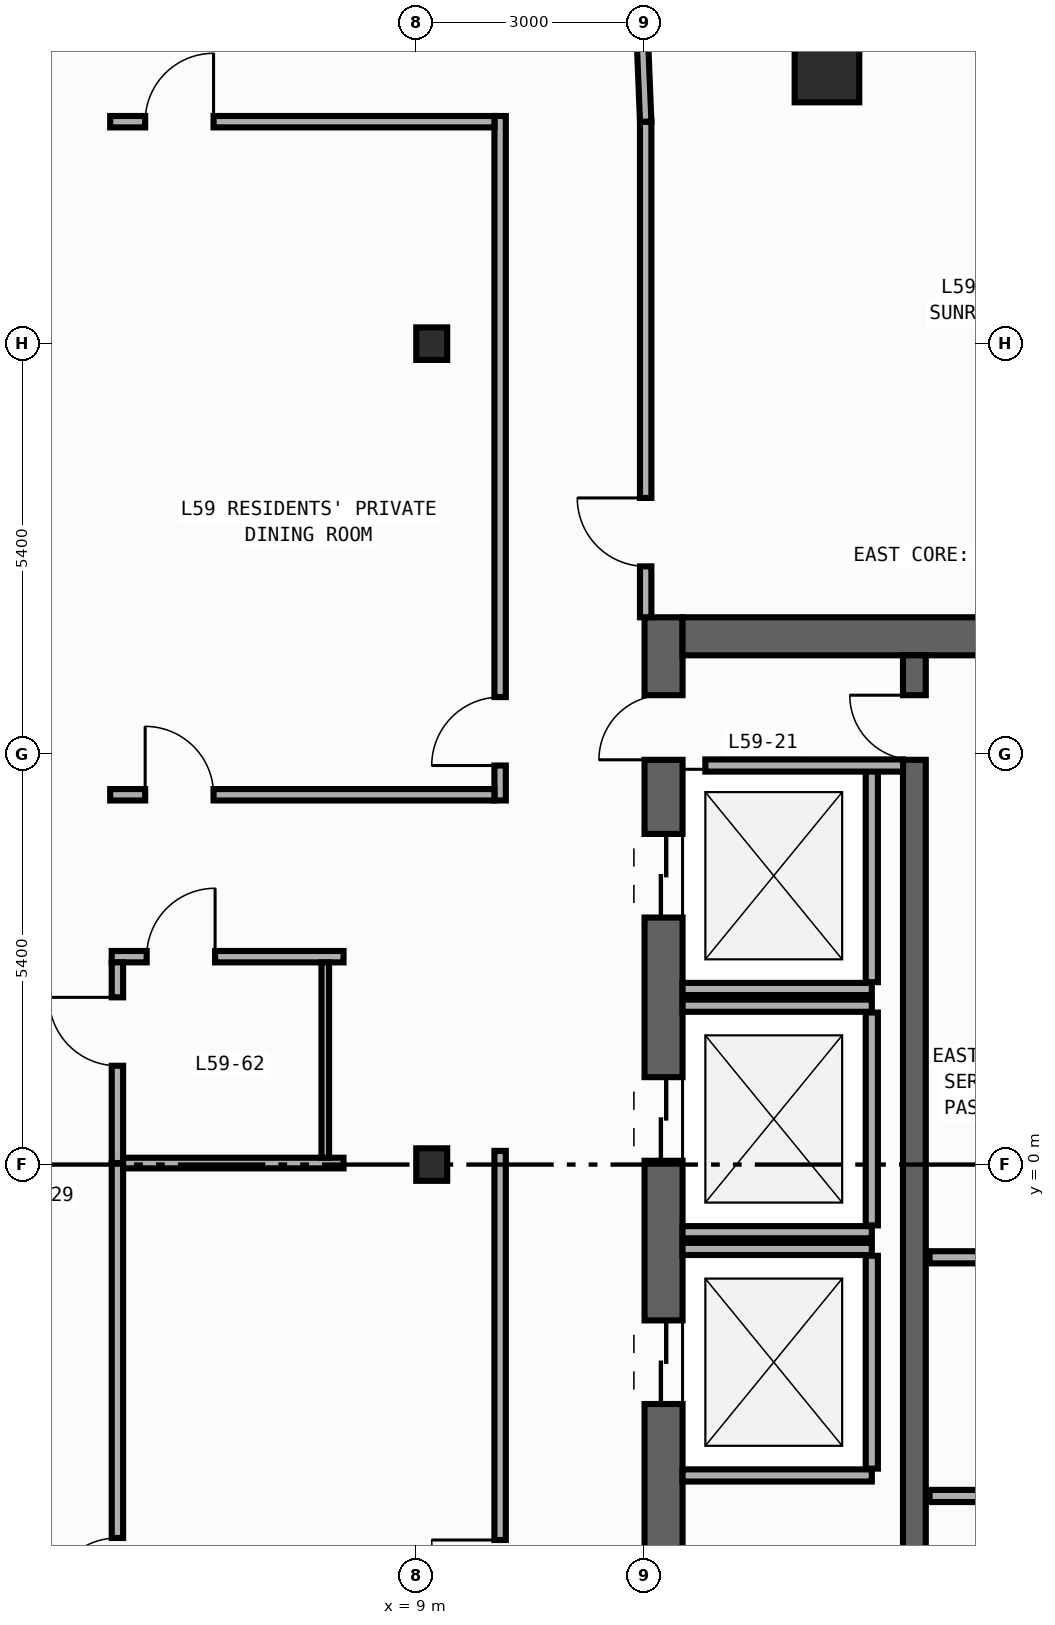
"""IFC4 building model, lengths in metres.
Left out: names, types, materials, properties, quantities, classifications, styles, units other than length and angle.
Written with IfcOpenShell. Run it as: python <this file> out.ifc"""

import sys

from ifc_helpers import new_model, si_unit, direction, frame, frame_2d, origin, origin_2d, place, context, subcontext, project, spatial, rectangle, i_section, extrude, element, fill, save


model = new_model("IFC4")
c1 = context("Model", 3, precision=1e-05, world=origin(), true_north=direction((0.0, 1.0)))
c2 = subcontext(c1, "Body", "Model", "MODEL_VIEW")
j1 = project(units=[si_unit("LENGTHUNIT", "METRE"), si_unit("PLANEANGLEUNIT", "RADIAN")], contexts=[c1])
p1 = place(None, origin())
s1 = spatial("IfcSite", under=j1, at=p1, CompositionType="ELEMENT")
p2 = place(p1, origin())
s2 = spatial("IfcBuilding", under=s1, at=p2, CompositionType="ELEMENT")
p3 = place(p2, frame((0.0, 0.0, 251.2)))
s3 = spatial("IfcBuildingStorey", under=s2, at=p3, CompositionType="ELEMENT", Elevation=251.2)
p4 = place(p3, frame((12.25, -19.8, 0.0), z_axis=(0.0, 0.0, 1.0), x_axis=(0.0, 1.0, 0.0)))
e1 = element("IfcWall", 1, at=p4, inside=s3, PredefinedType="SHEAR", context=c2, shape_type="SweptSolid", body=[
    extrude(rectangle(XDim=27.0, YDim=0.5, at=frame_2d((13.5, 0.0))), origin(), (0.0, 0.0, 1.0), 3.34),
])
p5 = place(p4, frame((23.05, 0.0, 0.0)))
e2 = element("IfcOpeningElement", 2, at=p5, cuts=e1, PredefinedType="OPENING", context=c2, shape_type="SweptSolid", body=[
    extrude(rectangle(XDim=1.1, YDim=2.2, at=frame_2d((0.55, 1.1))), frame((0.0, 0.26, 0.0), z_axis=(0.0, -1.0, 0.0), x_axis=(1.0, 0.0, 0.0)), (0.0, 0.0, 1.0), 0.52),
])
p6 = place(p4, frame((19.85, 0.0, 0.0)))
e3 = element("IfcOpeningElement", 3, at=p6, cuts=e1, PredefinedType="OPENING", context=c2, shape_type="SweptSolid", body=[
    extrude(rectangle(XDim=1.1, YDim=2.2, at=frame_2d((0.55, 1.1))), frame((0.0, 0.26, 0.0), z_axis=(0.0, -1.0, 0.0), x_axis=(1.0, 0.0, 0.0)), (0.0, 0.0, 1.0), 0.52),
])
p7 = place(p4, frame((16.65, 0.0, 0.0)))
e4 = element("IfcOpeningElement", 4, at=p7, cuts=e1, PredefinedType="OPENING", context=c2, shape_type="SweptSolid", body=[
    extrude(rectangle(XDim=1.1, YDim=2.2, at=frame_2d((0.55, 1.1))), frame((0.0, 0.26, 0.0), z_axis=(0.0, -1.0, 0.0), x_axis=(1.0, 0.0, 0.0)), (0.0, 0.0, 1.0), 0.52),
])
p8 = place(p4, frame((10.175, 0.0, 0.0)))
e5 = element("IfcOpeningElement", 5, at=p8, cuts=e1, PredefinedType="OPENING", context=c2, shape_type="SweptSolid", body=[
    extrude(rectangle(XDim=0.85, YDim=2.1, at=frame_2d((0.425, 1.05))), frame((0.0, 0.26, 0.0), z_axis=(0.0, -1.0, 0.0), x_axis=(1.0, 0.0, 0.0)), (0.0, 0.0, 1.0), 0.52),
])
p9 = place(p4, frame((12.725, 0.0, 0.0)))
e6 = element("IfcOpeningElement", 6, at=p9, cuts=e1, PredefinedType="OPENING", context=c2, shape_type="SweptSolid", body=[
    extrude(rectangle(XDim=1.15, YDim=2.2, at=frame_2d((0.575, 1.1))), frame((0.0, 0.26, 0.0), z_axis=(0.0, -1.0, 0.0), x_axis=(1.0, 0.0, 0.0)), (0.0, 0.0, 1.0), 0.52),
])
p10 = place(p4, frame((25.125, 0.0, 0.0)))
e7 = element("IfcOpeningElement", 7, at=p10, cuts=e1, PredefinedType="OPENING", context=c2, shape_type="SweptSolid", body=[
    extrude(rectangle(XDim=0.85, YDim=2.1, at=frame_2d((0.425, 1.05))), frame((0.0, 0.26, 0.0), z_axis=(0.0, -1.0, 0.0), x_axis=(1.0, 0.0, 0.0)), (0.0, 0.0, 1.0), 0.52),
])
p11 = place(p3, frame((12.5, 6.95, 0.0), z_axis=(0.0, 0.0, 1.0), x_axis=(1.0, 0.0, 0.0)))
e8 = element("IfcWall", 8, at=p11, inside=s3, PredefinedType="SHEAR", context=c2, shape_type="SweptSolid", body=[
    extrude(rectangle(XDim=7.4, YDim=0.5, at=frame_2d((3.7, 0.0))), origin(), (0.0, 0.0, 1.0), 3.34),
])
p12 = place(p3, frame((15.55, -19.3, 0.0), z_axis=(0.0, 0.0, 1.0), x_axis=(0.0, 1.0, 0.0)))
e9 = element("IfcWall", 9, at=p12, inside=s3, PredefinedType="SHEAR", context=c2, shape_type="SweptSolid", body=[
    extrude(rectangle(XDim=26.0, YDim=0.3, at=frame_2d((13.0, 0.0))), origin(), (0.0, 0.0, 1.0), 3.34),
])
p13 = place(p12, frame((12.225, 0.0, 0.0)))
e10 = element("IfcOpeningElement", 10, at=p13, cuts=e9, PredefinedType="OPENING", context=c2, shape_type="SweptSolid", body=[
    extrude(rectangle(XDim=1.15, YDim=2.2, at=frame_2d((0.575, 1.1))), frame((0.0, 0.16, 0.0), z_axis=(0.0, -1.0, 0.0), x_axis=(1.0, 0.0, 0.0)), (0.0, 0.0, 1.0), 0.32),
])
p14 = place(p12, frame((24.625, 0.0, 0.0)))
e11 = element("IfcOpeningElement", 11, at=p14, cuts=e9, PredefinedType="OPENING", context=c2, shape_type="SweptSolid", body=[
    extrude(rectangle(XDim=0.85, YDim=2.1, at=frame_2d((0.425, 1.05))), frame((0.0, 0.16, 0.0), z_axis=(0.0, -1.0, 0.0), x_axis=(1.0, 0.0, 0.0)), (0.0, 0.0, 1.0), 0.32),
])
for number, where, z_axis, x_axis in (
    (12, (9.2, 0.0, 0.0), (0.0, 0.0, 1.0), (1.0, 0.0, 0.0)),
    (13, (9.2, 10.8, 0.0), (0.0, 0.0, 1.0), (1.0, 0.0, 0.0)),
):
    element("IfcColumn", number, at=place(p3, frame(where, z_axis=z_axis, x_axis=x_axis)), inside=s3, PredefinedType="COLUMN", context=c2, shape_type="SweptSolid", body=[
        extrude(i_section(OverallWidth=0.407, OverallDepth=0.428, WebThickness=0.02, FlangeThickness=0.035, FilletRadius=0.022, at=origin_2d()), origin(), (0.0, 0.0, 1.0), 3.6),
    ])
p15 = place(p3, frame((14.4, 14.4, 0.0), z_axis=(0.0, 0.0, 1.0), x_axis=(1.0, 0.0, 0.0)))
e14 = element("IfcColumn", 14, at=p15, inside=s3, PredefinedType="COLUMN", context=c2, shape_type="SweptSolid", body=[
    extrude(rectangle(XDim=0.85, YDim=0.85, at=origin_2d()), origin(), (0.0, 0.0, 1.0), 3.6),
])
p16 = place(p3, frame((12.5, 2.31, 0.0), z_axis=(0.0, 0.0, 1.0), x_axis=(1.0, 0.0, 0.0)))
e15 = element("IfcWall", 15, at=p16, inside=s3, PredefinedType="STANDARD", context=c2, shape_type="SweptSolid", body=[
    extrude(rectangle(XDim=2.49, YDim=0.16, at=frame_2d((1.245, 0.0))), origin(), (0.0, 0.0, 1.0), 3.34),
])
p17 = place(p3, frame((14.99, 2.4, 0.0), z_axis=(0.0, 0.0, 1.0), x_axis=(0.0, 1.0, 0.0)))
e16 = element("IfcWall", 16, at=p17, inside=s3, PredefinedType="STANDARD", context=c2, shape_type="SweptSolid", body=[
    extrude(rectangle(XDim=2.8, YDim=0.16, at=frame_2d((1.4, 0.0))), origin(), (0.0, 0.0, 1.0), 3.34),
])
for number, where, z_axis, x_axis in (
    (17, (12.5, -0.89, 0.0), (0.0, 0.0, 1.0), (1.0, 0.0, 0.0)),
    (18, (12.5, 2.09, 0.0), (0.0, 0.0, 1.0), (1.0, 0.0, 0.0)),
):
    element("IfcWall", number, at=place(p3, frame(where, z_axis=z_axis, x_axis=x_axis)), inside=s3, PredefinedType="STANDARD", context=c2, shape_type="SweptSolid", body=[
        extrude(rectangle(XDim=2.49, YDim=0.16, at=frame_2d((1.245, 0.0))), origin(), (0.0, 0.0, 1.0), 3.34),
    ])
p18 = place(p3, frame((14.99, -0.8, 0.0), z_axis=(0.0, 0.0, 1.0), x_axis=(0.0, 1.0, 0.0)))
e19 = element("IfcWall", 19, at=p18, inside=s3, PredefinedType="STANDARD", context=c2, shape_type="SweptSolid", body=[
    extrude(rectangle(XDim=2.8, YDim=0.16, at=frame_2d((1.4, 0.0))), origin(), (0.0, 0.0, 1.0), 3.34),
])
for number, where, z_axis, x_axis in (
    (20, (12.5, -4.09, 0.0), (0.0, 0.0, 1.0), (1.0, 0.0, 0.0)),
    (21, (12.5, -1.11, 0.0), (0.0, 0.0, 1.0), (1.0, 0.0, 0.0)),
):
    element("IfcWall", number, at=place(p3, frame(where, z_axis=z_axis, x_axis=x_axis)), inside=s3, PredefinedType="STANDARD", context=c2, shape_type="SweptSolid", body=[
        extrude(rectangle(XDim=2.49, YDim=0.16, at=frame_2d((1.245, 0.0))), origin(), (0.0, 0.0, 1.0), 3.34),
    ])
p19 = place(p3, frame((14.99, -4.0, 0.0), z_axis=(0.0, 0.0, 1.0), x_axis=(0.0, 1.0, 0.0)))
e22 = element("IfcWall", 22, at=p19, inside=s3, PredefinedType="STANDARD", context=c2, shape_type="SweptSolid", body=[
    extrude(rectangle(XDim=2.8, YDim=0.16, at=frame_2d((1.4, 0.0))), origin(), (0.0, 0.0, 1.0), 3.34),
])
p20 = place(p3, frame((15.75, -4.36, 0.0), z_axis=(0.0, 0.0, 1.0), x_axis=(1.0, 0.0, 0.0)))
e23 = element("IfcWall", 23, at=p20, inside=s3, PredefinedType="STANDARD", context=c2, shape_type="SweptSolid", body=[
    extrude(rectangle(XDim=3.8, YDim=0.16, at=frame_2d((1.9, 0.0))), origin(), (0.0, 0.0, 1.0), 3.34),
])
p21 = place(p20, frame((1.47, 0.0, 0.0)))
e24 = element("IfcOpeningElement", 24, at=p21, cuts=e23, PredefinedType="OPENING", context=c2, shape_type="SweptSolid", body=[
    extrude(rectangle(XDim=1.15, YDim=2.2, at=frame_2d((0.575, 1.1))), frame((0.0, 0.09, 0.0), z_axis=(0.0, -1.0, 0.0), x_axis=(1.0, 0.0, 0.0)), (0.0, 0.0, 1.0), 0.18),
])
p22 = place(p3, frame((15.75, -1.22, 0.0), z_axis=(0.0, 0.0, 1.0), x_axis=(1.0, 0.0, 0.0)))
e25 = element("IfcWall", 25, at=p22, inside=s3, PredefinedType="STANDARD", context=c2, shape_type="SweptSolid", body=[
    extrude(rectangle(XDim=3.8, YDim=0.16, at=frame_2d((1.9, 0.0))), origin(), (0.0, 0.0, 1.0), 3.34),
])
p23 = place(p3, frame((12.8, 5.25, 0.0), z_axis=(0.0, 0.0, 1.0), x_axis=(1.0, 0.0, 0.0)))
e26 = element("IfcWall", 26, at=p23, inside=s3, PredefinedType="STANDARD", context=c2, shape_type="SweptSolid", body=[
    extrude(rectangle(XDim=2.6, YDim=0.16, at=frame_2d((1.3, 0.0))), origin(), (0.0, 0.0, 1.0), 3.34),
])
p24 = place(p3, frame((12.015, 7.2, 0.0), z_axis=(0.0, 0.0, 1.0), x_axis=(0.0, 1.0, 0.0)))
e27 = element("IfcWall", 27, at=p24, inside=s3, PredefinedType="PARTITIONING", context=c2, shape_type="SweptSolid", body=[
    extrude(rectangle(XDim=6.52, YDim=0.15, at=frame_2d((3.26, 0.0))), origin(), (0.0, 0.0, 1.0), 3.34),
])
p25 = place(p24, frame((0.67, 0.0, 0.0)))
e28 = element("IfcOpeningElement", 28, at=p25, cuts=e27, PredefinedType="OPENING", context=c2, shape_type="SweptSolid", body=[
    extrude(rectangle(XDim=0.9, YDim=2.15, at=frame_2d((0.45, 1.075))), frame((0.0, 0.085, 0.0), z_axis=(0.0, -1.0, 0.0), x_axis=(1.0, 0.0, 0.0)), (0.0, 0.0, 1.0), 0.17),
])
p26 = place(p3, frame((10.1, 4.79, 0.0), z_axis=(0.0, 0.0, 1.0), x_axis=(0.0, 1.0, 0.0)))
e29 = element("IfcWall", 29, at=p26, inside=s3, PredefinedType="PARTITIONING", context=c2, shape_type="SweptSolid", body=[
    extrude(rectangle(XDim=9.005, YDim=0.15, at=frame_2d((4.502, 0.0))), origin(), (0.0, 0.0, 1.0), 3.34),
])
p27 = place(p26, frame((0.46, 0.0, 0.0)))
e30 = element("IfcOpeningElement", 30, at=p27, cuts=e29, PredefinedType="OPENING", context=c2, shape_type="SweptSolid", body=[
    extrude(rectangle(XDim=0.9, YDim=2.15, at=frame_2d((0.45, 1.075))), frame((0.0, 0.085, 0.0), z_axis=(0.0, -1.0, 0.0), x_axis=(1.0, 0.0, 0.0)), (0.0, 0.0, 1.0), 0.17),
])
p28 = place(p3, frame((10.1, -13.795, 0.0), z_axis=(0.0, 0.0, 1.0), x_axis=(0.0, 1.0, 0.0)))
e31 = element("IfcWall", 31, at=p28, inside=s3, PredefinedType="PARTITIONING", context=c2, shape_type="SweptSolid", body=[
    extrude(rectangle(XDim=13.975, YDim=0.15, at=frame_2d((6.987, 0.0))), origin(), (0.0, 0.0, 1.0), 3.34),
])
p29 = place(p28, frame((7.956, 0.0, 0.0)))
e32 = element("IfcOpeningElement", 32, at=p29, cuts=e31, PredefinedType="OPENING", context=c2, shape_type="SweptSolid", body=[
    extrude(rectangle(XDim=0.9, YDim=2.15, at=frame_2d((0.45, 1.075))), frame((0.0, 0.085, 0.0), z_axis=(0.0, -1.0, 0.0), x_axis=(1.0, 0.0, 0.0)), (0.0, 0.0, 1.0), 0.17),
])
p30 = place(p3, frame((4.97, 4.865, 0.0), z_axis=(0.0, 0.0, 1.0), x_axis=(1.0, 0.0, 0.0)))
e33 = element("IfcWall", 33, at=p30, inside=s3, PredefinedType="PARTITIONING", context=c2, shape_type="SweptSolid", body=[
    extrude(rectangle(XDim=5.055, YDim=0.15, at=frame_2d((2.527, 0.0))), origin(), (0.0, 0.0, 1.0), 3.34),
])
p31 = place(p30, frame((0.46, 0.0, 0.0)))
e34 = element("IfcOpeningElement", 34, at=p31, cuts=e33, PredefinedType="OPENING", context=c2, shape_type="SweptSolid", body=[
    extrude(rectangle(XDim=0.9, YDim=2.15, at=frame_2d((0.45, 1.075))), frame((0.0, 0.085, 0.0), z_axis=(0.0, -1.0, 0.0), x_axis=(1.0, 0.0, 0.0)), (0.0, 0.0, 1.0), 0.17),
])
p32 = place(p3, frame((4.99, 2.735, 0.0), z_axis=(0.0, 0.0, 1.0), x_axis=(1.0, 0.0, 0.0)))
e35 = element("IfcWall", 35, at=p32, inside=s3, PredefinedType="PARTITIONING", context=c2, shape_type="SweptSolid", body=[
    extrude(rectangle(XDim=3.05, YDim=0.15, at=frame_2d((1.525, 0.0))), origin(), (0.0, 0.0, 1.0), 3.34),
])
p33 = place(p32, frame((0.46, 0.0, 0.0)))
e36 = element("IfcOpeningElement", 36, at=p33, cuts=e35, PredefinedType="OPENING", context=c2, shape_type="SweptSolid", body=[
    extrude(rectangle(XDim=0.9, YDim=2.15, at=frame_2d((0.45, 1.075))), frame((0.0, 0.085, 0.0), z_axis=(0.0, -1.0, 0.0), x_axis=(1.0, 0.0, 0.0)), (0.0, 0.0, 1.0), 0.17),
])
p34 = place(p3, frame((5.065, 0.02, 0.0), z_axis=(0.0, 0.0, 1.0), x_axis=(0.0, 1.0, 0.0)))
e37 = element("IfcWall", 37, at=p34, inside=s3, PredefinedType="PARTITIONING", context=c2, shape_type="SweptSolid", body=[
    extrude(rectangle(XDim=2.64, YDim=0.15, at=frame_2d((1.32, 0.0))), origin(), (0.0, 0.0, 1.0), 2.99),
])
p35 = place(p34, frame((1.28, 0.0, 0.0)))
e38 = element("IfcOpeningElement", 38, at=p35, cuts=e37, PredefinedType="OPENING", context=c2, shape_type="SweptSolid", body=[
    extrude(rectangle(XDim=0.9, YDim=2.15, at=frame_2d((0.45, 1.075))), frame((0.0, 0.085, 0.0), z_axis=(0.0, -1.0, 0.0), x_axis=(1.0, 0.0, 0.0)), (0.0, 0.0, 1.0), 0.17),
])
p36 = place(p3, frame((5.065, -13.795, 0.0), z_axis=(0.0, 0.0, 1.0), x_axis=(0.0, 1.0, 0.0)))
e39 = element("IfcWall", 39, at=p36, inside=s3, PredefinedType="PARTITIONING", context=c2, shape_type="SweptSolid", body=[
    extrude(rectangle(XDim=13.815, YDim=0.15, at=frame_2d((6.907, 0.0))), origin(), (0.0, 0.0, 1.0), 2.99),
])
p37 = place(p36, frame((7.982, 0.0, 0.0)))
e40 = element("IfcOpeningElement", 40, at=p37, cuts=e39, PredefinedType="OPENING", context=c2, shape_type="SweptSolid", body=[
    extrude(rectangle(XDim=0.9, YDim=2.15, at=frame_2d((0.45, 1.075))), frame((0.0, 0.085, 0.0), z_axis=(0.0, -1.0, 0.0), x_axis=(1.0, 0.0, 0.0)), (0.0, 0.0, 1.0), 0.17),
])
p38 = place(p3, frame((12.015, 13.72, 0.0), z_axis=(0.0, 0.0, 1.0), x_axis=(-0.040046877756, 0.99919780203, 0.0)))
e41 = element("IfcWall", 41, at=p38, inside=s3, PredefinedType="PARTITIONING", context=c2, shape_type="SweptSolid", body=[
    extrude(rectangle(XDim=1.731, YDim=0.15, at=frame_2d((0.866, 0.0))), origin(), (0.0, 0.0, 1.0), 3.34),
])
p39 = place(p3, frame((4.97, 13.72, 0.0), z_axis=(0.0, 0.0, 1.0), x_axis=(1.0, 0.0, 0.0)))
e42 = element("IfcWall", 42, at=p39, inside=s3, PredefinedType="PARTITIONING", context=c2, shape_type="SweptSolid", body=[
    extrude(rectangle(XDim=5.055, YDim=0.15, at=frame_2d((2.527, 0.0))), origin(), (0.0, 0.0, 1.0), 3.34),
])
p40 = place(p39, frame((0.46, 0.0, 0.0)))
e43 = element("IfcOpeningElement", 43, at=p40, cuts=e42, PredefinedType="OPENING", context=c2, shape_type="SweptSolid", body=[
    extrude(rectangle(XDim=0.9, YDim=2.15, at=frame_2d((0.45, 1.075))), frame((0.0, 0.085, 0.0), z_axis=(0.0, -1.0, 0.0), x_axis=(1.0, 0.0, 0.0)), (0.0, 0.0, 1.0), 0.17),
])
p41 = place(p3, frame((5.14, 0.02, 0.0), z_axis=(0.0, 0.0, 1.0), x_axis=(1.0, 0.0, 0.0)))
e44 = element("IfcWall", 44, at=p41, inside=s3, PredefinedType="PARTITIONING", context=c2, shape_type="SweptSolid", body=[
    extrude(rectangle(XDim=2.9, YDim=0.14, at=frame_2d((1.45, 0.0))), origin(), (0.0, 0.0, 1.0), 2.44),
])
p42 = place(p3, frame((7.8, 2.66, 0.0), z_axis=(0.0, 0.0, 1.0), x_axis=(0.0, -1.0, 0.0)))
e45 = element("IfcWall", 45, at=p42, inside=s3, PredefinedType="PARTITIONING", context=c2, shape_type="SweptSolid", body=[
    extrude(rectangle(XDim=2.57, YDim=0.1, at=frame_2d((1.285, 0.0))), origin(), (0.0, 0.0, 1.0), 3.34),
])
p43 = place(p5, origin())
e46 = element("IfcDoor", 46, at=p43, inside=s3, OperationType="DOUBLE_DOOR_SLIDING", PredefinedType="DOOR", context=c2, shape_type="SweptSolid", body=[
    extrude(rectangle(XDim=1.1, YDim=2.2, at=frame_2d((0.55, 1.1))), frame((0.0, 0.025, 0.0), z_axis=(0.0, -1.0, 0.0), x_axis=(1.0, 0.0, 0.0)), (0.0, 0.0, 1.0), 0.05),
])
fill(e2, e46)
p44 = place(p6, origin())
e47 = element("IfcDoor", 47, at=p44, inside=s3, OperationType="DOUBLE_DOOR_SLIDING", PredefinedType="DOOR", context=c2, shape_type="SweptSolid", body=[
    extrude(rectangle(XDim=1.1, YDim=2.2, at=frame_2d((0.55, 1.1))), frame((0.0, 0.025, 0.0), z_axis=(0.0, -1.0, 0.0), x_axis=(1.0, 0.0, 0.0)), (0.0, 0.0, 1.0), 0.05),
])
fill(e3, e47)
p45 = place(p7, origin())
e48 = element("IfcDoor", 48, at=p45, inside=s3, OperationType="DOUBLE_DOOR_SLIDING", PredefinedType="DOOR", context=c2, shape_type="SweptSolid", body=[
    extrude(rectangle(XDim=1.1, YDim=2.2, at=frame_2d((0.55, 1.1))), frame((0.0, 0.025, 0.0), z_axis=(0.0, -1.0, 0.0), x_axis=(1.0, 0.0, 0.0)), (0.0, 0.0, 1.0), 0.05),
])
fill(e4, e48)
p46 = place(p10, origin())
e49 = element("IfcDoor", 49, at=p46, inside=s3, OperationType="SINGLE_SWING_LEFT", PredefinedType="DOOR", context=c2, shape_type="SweptSolid", body=[
    extrude(rectangle(XDim=0.85, YDim=2.1, at=frame_2d((0.425, 1.05))), frame((0.0, 0.025, 0.0), z_axis=(0.0, -1.0, 0.0), x_axis=(1.0, 0.0, 0.0)), (0.0, 0.0, 1.0), 0.05),
])
fill(e7, e49)
p47 = place(p14, origin())
e50 = element("IfcDoor", 50, at=p47, inside=s3, OperationType="SINGLE_SWING_RIGHT", PredefinedType="DOOR", context=c2, shape_type="SweptSolid", body=[
    extrude(rectangle(XDim=0.85, YDim=2.1, at=frame_2d((0.425, 1.05))), frame((0.0, 0.025, 0.0), z_axis=(0.0, -1.0, 0.0), x_axis=(1.0, 0.0, 0.0)), (0.0, 0.0, 1.0), 0.05),
])
fill(e11, e50)
p48 = place(p25, origin())
e51 = element("IfcDoor", 51, at=p48, inside=s3, OperationType="SINGLE_SWING_RIGHT", PredefinedType="DOOR", context=c2, shape_type="SweptSolid", body=[
    extrude(rectangle(XDim=0.9, YDim=2.15, at=frame_2d((0.45, 1.075))), frame((0.0, 0.025, 0.0), z_axis=(0.0, -1.0, 0.0), x_axis=(1.0, 0.0, 0.0)), (0.0, 0.0, 1.0), 0.05),
])
fill(e28, e51)
p49 = place(p27, origin())
e52 = element("IfcDoor", 52, at=p49, inside=s3, OperationType="SINGLE_SWING_LEFT", PredefinedType="DOOR", context=c2, shape_type="SweptSolid", body=[
    extrude(rectangle(XDim=0.9, YDim=2.15, at=frame_2d((0.45, 1.075))), frame((0.0, 0.025, 0.0), z_axis=(0.0, -1.0, 0.0), x_axis=(1.0, 0.0, 0.0)), (0.0, 0.0, 1.0), 0.05),
])
fill(e30, e52)
p50 = place(p29, origin())
e53 = element("IfcDoor", 53, at=p50, inside=s3, OperationType="SINGLE_SWING_RIGHT", PredefinedType="DOOR", context=c2, shape_type="SweptSolid", body=[
    extrude(rectangle(XDim=0.9, YDim=2.15, at=frame_2d((0.45, 1.075))), frame((0.0, 0.025, 0.0), z_axis=(0.0, -1.0, 0.0), x_axis=(1.0, 0.0, 0.0)), (0.0, 0.0, 1.0), 0.05),
])
fill(e32, e53)
p51 = place(p31, origin())
e54 = element("IfcDoor", 54, at=p51, inside=s3, OperationType="SINGLE_SWING_LEFT", PredefinedType="DOOR", context=c2, shape_type="SweptSolid", body=[
    extrude(rectangle(XDim=0.9, YDim=2.15, at=frame_2d((0.45, 1.075))), frame((0.0, 0.025, 0.0), z_axis=(0.0, -1.0, 0.0), x_axis=(1.0, 0.0, 0.0)), (0.0, 0.0, 1.0), 0.05),
])
fill(e34, e54)
p52 = place(p33, origin())
e55 = element("IfcDoor", 55, at=p52, inside=s3, OperationType="SINGLE_SWING_RIGHT", PredefinedType="DOOR", context=c2, shape_type="SweptSolid", body=[
    extrude(rectangle(XDim=0.9, YDim=2.15, at=frame_2d((0.45, 1.075))), frame((0.0, 0.025, 0.0), z_axis=(0.0, -1.0, 0.0), x_axis=(1.0, 0.0, 0.0)), (0.0, 0.0, 1.0), 0.05),
])
fill(e36, e55)
p53 = place(p35, origin())
e56 = element("IfcDoor", 56, at=p53, inside=s3, OperationType="SINGLE_SWING_RIGHT", PredefinedType="DOOR", context=c2, shape_type="SweptSolid", body=[
    extrude(rectangle(XDim=0.9, YDim=2.15, at=frame_2d((0.45, 1.075))), frame((0.0, 0.025, 0.0), z_axis=(0.0, -1.0, 0.0), x_axis=(1.0, 0.0, 0.0)), (0.0, 0.0, 1.0), 0.05),
])
fill(e38, e56)
p54 = place(p37, origin())
e57 = element("IfcDoor", 57, at=p54, inside=s3, OperationType="SINGLE_SWING_LEFT", PredefinedType="DOOR", context=c2, shape_type="SweptSolid", body=[
    extrude(rectangle(XDim=0.9, YDim=2.15, at=frame_2d((0.45, 1.075))), frame((0.0, 0.025, 0.0), z_axis=(0.0, -1.0, 0.0), x_axis=(1.0, 0.0, 0.0)), (0.0, 0.0, 1.0), 0.05),
])
fill(e40, e57)
p55 = place(p40, origin())
e58 = element("IfcDoor", 58, at=p55, inside=s3, OperationType="SINGLE_SWING_RIGHT", PredefinedType="DOOR", context=c2, shape_type="SweptSolid", body=[
    extrude(rectangle(XDim=0.9, YDim=2.15, at=frame_2d((0.45, 1.075))), frame((0.0, 0.025, 0.0), z_axis=(0.0, -1.0, 0.0), x_axis=(1.0, 0.0, 0.0)), (0.0, 0.0, 1.0), 0.05),
])
fill(e43, e58)
save(model, sys.argv[1])
